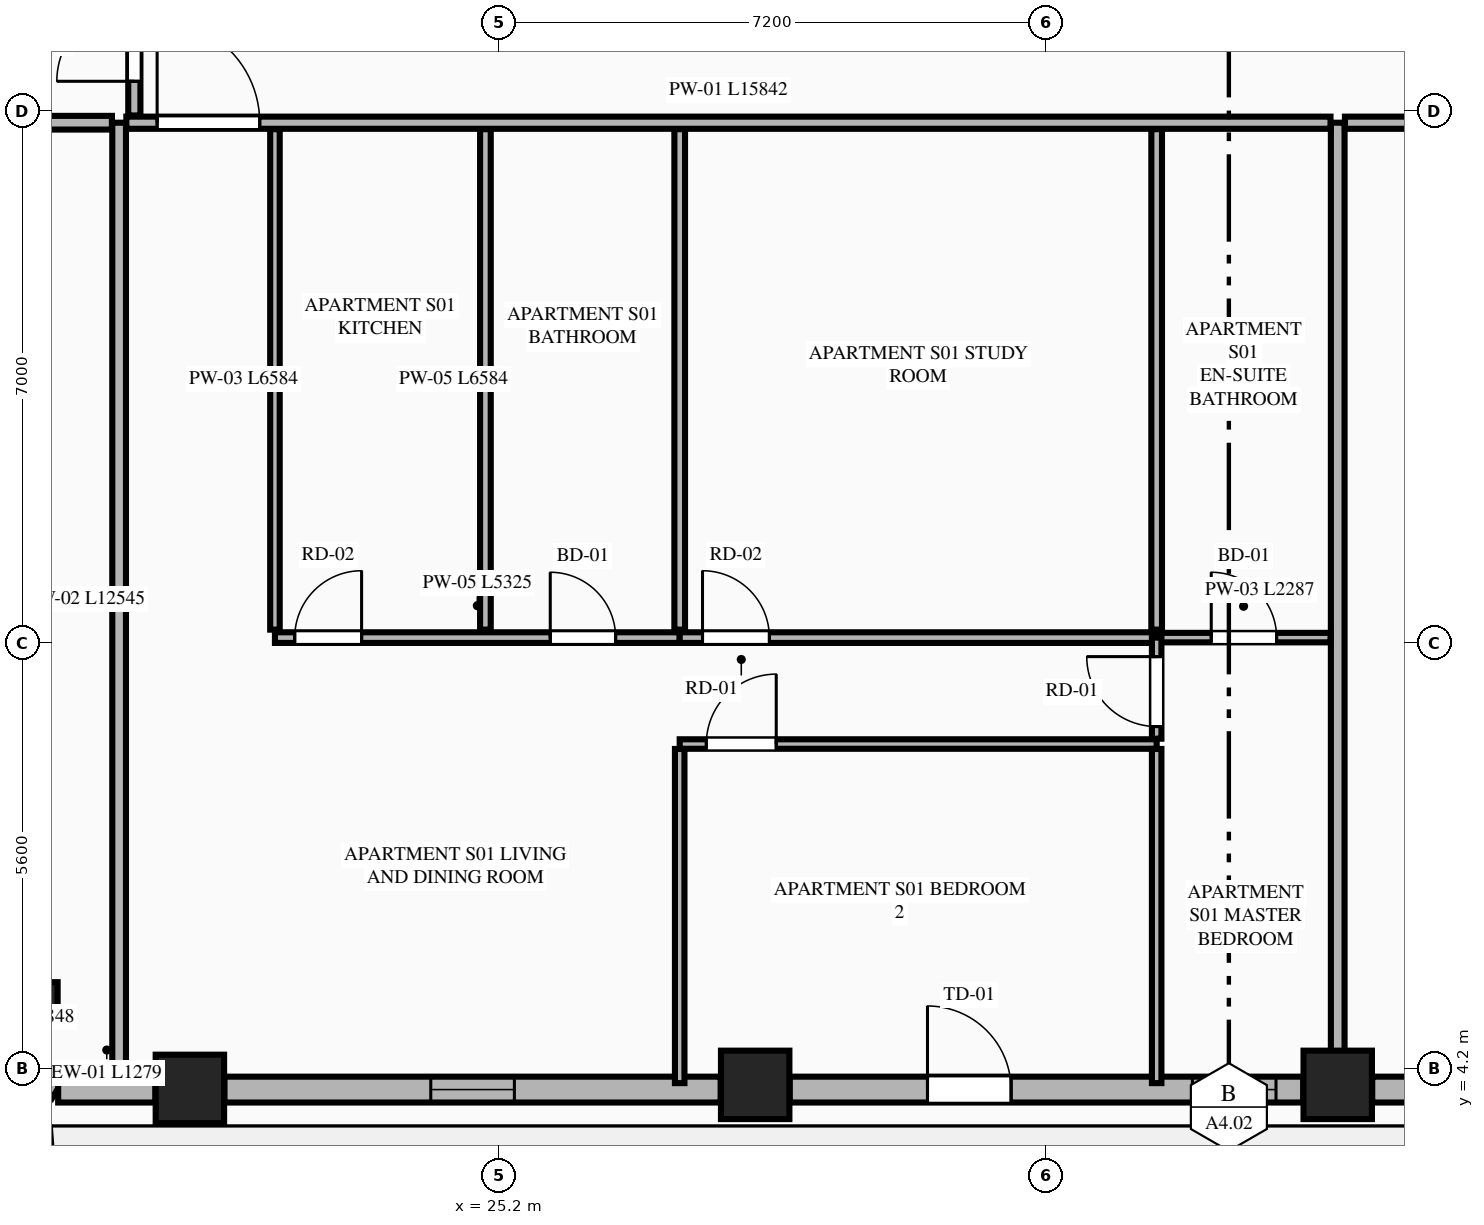
"""IFC4 building model, lengths in metres.
Left out: names, types, materials, properties, quantities, classifications, styles, units other than length and angle.
Written with IfcOpenShell. Run it as: python <this file> out.ifc"""

import sys

from ifc_helpers import new_model, si_unit, direction, frame, frame_2d, origin, origin_2d, place, context, subcontext, project, spatial, rectangle, extrude, element, fill, save


model = new_model("IFC4")
c1 = context("Model", 3, precision=1e-05, world=origin(), true_north=direction((0.0, 1.0)))
c2 = subcontext(c1, "Body", "Model", "MODEL_VIEW")
j1 = project(units=[si_unit("LENGTHUNIT", "METRE"), si_unit("PLANEANGLEUNIT", "RADIAN")], contexts=[c1])
p1 = place(None, origin())
s1 = spatial("IfcSite", under=j1, at=p1, CompositionType="ELEMENT")
p2 = place(p1, origin())
s2 = spatial("IfcBuilding", under=s1, at=p2, CompositionType="ELEMENT")
p3 = place(p2, frame((0.0, 0.0, 153.5)))
s3 = spatial("IfcBuildingStorey", under=s2, at=p3, CompositionType="ELEMENT", Elevation=153.5)
for number, where, z_axis, x_axis in (
    (1, (21.131, 3.939, 0.0), (0.0, 0.0, 1.0), (1.0, 0.0, 0.0)),
    (2, (28.568, 3.992, 0.0), (0.0, 0.0, 1.0), (1.0, 0.0, 0.0)),
    (3, (36.232, 3.992, 0.0), (0.0, 0.0, 1.0), (1.0, 0.0, 0.0)),
):
    element("IfcColumn", number, at=place(p3, frame(where, z_axis=z_axis, x_axis=x_axis)), inside=s3, PredefinedType="COLUMN", context=c2, shape_type="SweptSolid", body=[
        extrude(rectangle(XDim=0.9, YDim=0.9, at=origin_2d()), origin(), (0.0, 0.0, 1.0), 3.55),
    ])
p4 = place(p3, frame((19.141, 5.093, 0.0), z_axis=(0.0, 0.0, 1.0), x_axis=(0.865160173452, -0.501495637342, 0.0)))
e4 = element("IfcColumn", 4, at=p4, inside=s3, PredefinedType="PILASTER", context=c2, shape_type="SweptSolid", body=[
    extrude(rectangle(XDim=0.5, YDim=0.35, at=origin_2d()), origin(), (0.0, 0.0, 1.0), 3.55),
])
p5 = place(p3, frame((17.829, 4.923, 0.0), z_axis=(0.0, 0.0, 1.0), x_axis=(0.851798915137, -0.523868884523, 0.0)))
e5 = element("IfcWall", 5, at=p5, inside=s3, PredefinedType="STANDARD", context=c2, shape_type="SweptSolid", body=[
    extrude(rectangle(XDim=1.848, YDim=0.34, at=frame_2d((0.924, 0.0))), origin(), (0.0, 0.0, 1.0), 3.34),
])
p6 = place(p3, frame((19.398, 3.93, 0.0), z_axis=(0.0, 0.0, 1.0), x_axis=(1.0, 0.0, 0.0)))
e6 = element("IfcWall", 6, at=p6, inside=s3, PredefinedType="STANDARD", context=c2, shape_type="SweptSolid", body=[
    extrude(rectangle(XDim=1.279, YDim=0.34, at=frame_2d((0.64, 0.0))), origin(), (0.0, 0.0, 1.0), 3.34),
])
p7 = place(p3, frame((21.585, 3.93, 0.0), z_axis=(0.0, 0.0, 1.0), x_axis=(1.0, 0.0, 0.0)))
e7 = element("IfcWall", 7, at=p7, inside=s3, PredefinedType="STANDARD", context=c2, shape_type="SweptSolid", body=[
    extrude(rectangle(XDim=6.529, YDim=0.34, at=frame_2d((3.265, 0.0))), origin(), (0.0, 0.0, 1.0), 2.797),
])
p8 = place(p7, frame((2.715, 0.0, 0.75)))
e8 = element("IfcOpeningElement", 8, at=p8, cuts=e7, PredefinedType="OPENING", context=c2, shape_type="SweptSolid", body=[
    extrude(rectangle(XDim=1.1, YDim=1.897, at=frame_2d((0.55, 0.948))), frame((0.0, 0.18, 0.0), z_axis=(0.0, -1.0, 0.0), x_axis=(1.0, 0.0, 0.0)), (0.0, 0.0, 1.0), 0.36),
])
p9 = place(p3, frame((29.022, 3.93, 0.0), z_axis=(0.0, 0.0, 1.0), x_axis=(1.0, 0.0, 0.0)))
e9 = element("IfcWall", 9, at=p9, inside=s3, PredefinedType="STANDARD", context=c2, shape_type="SweptSolid", body=[
    extrude(rectangle(XDim=6.756, YDim=0.34, at=frame_2d((3.378, 0.0))), origin(), (0.0, 0.0, 1.0), 2.797),
])
p10 = place(p9, frame((1.813, 0.0, 0.0)))
e10 = element("IfcOpeningElement", 10, at=p10, cuts=e9, PredefinedType="OPENING", context=c2, shape_type="SweptSolid", body=[
    extrude(rectangle(XDim=1.1, YDim=2.25, at=frame_2d((0.55, 1.125))), frame((0.0, 0.18, 0.0), z_axis=(0.0, -1.0, 0.0), x_axis=(1.0, 0.0, 0.0)), (0.0, 0.0, 1.0), 0.36),
])
p11 = place(p9, frame((5.298, 0.0, 0.75)))
e11 = element("IfcOpeningElement", 11, at=p11, cuts=e9, PredefinedType="OPENING", context=c2, shape_type="SweptSolid", body=[
    extrude(rectangle(XDim=1.1, YDim=1.897, at=frame_2d((0.55, 0.948))), frame((0.0, 0.18, 0.0), z_axis=(0.0, -1.0, 0.0), x_axis=(1.0, 0.0, 0.0)), (0.0, 0.0, 1.0), 0.36),
])
p12 = place(p3, frame((36.686, 3.93, 0.0), z_axis=(0.0, 0.0, 1.0), x_axis=(1.0, 0.0, 0.0)))
e12 = element("IfcWall", 12, at=p12, inside=s3, PredefinedType="STANDARD", context=c2, shape_type="SweptSolid", body=[
    extrude(rectangle(XDim=6.529, YDim=0.34, at=frame_2d((3.265, 0.0))), origin(), (0.0, 0.0, 1.0), 2.797),
])
p13 = place(p12, frame((2.715, 0.0, 0.75)))
e13 = element("IfcOpeningElement", 13, at=p13, cuts=e12, PredefinedType="OPENING", context=c2, shape_type="SweptSolid", body=[
    extrude(rectangle(XDim=1.1, YDim=1.897, at=frame_2d((0.55, 0.948))), frame((0.0, 0.18, 0.0), z_axis=(0.0, -1.0, 0.0), x_axis=(1.0, 0.0, 0.0)), (0.0, 0.0, 1.0), 0.36),
])
p14 = place(p3, frame((20.2, 4.105, 0.0), z_axis=(0.0, 0.0, 1.0), x_axis=(0.0, 1.0, 0.0)))
e14 = element("IfcWall", 14, at=p14, inside=s3, PredefinedType="PARTITIONING", context=c2, shape_type="SweptSolid", body=[
    extrude(rectangle(XDim=12.545, YDim=0.18, at=frame_2d((6.272, 0.0))), origin(), (0.0, 0.0, 1.0), 3.34),
])
p15 = place(p3, frame((36.232, 4.105, 0.0), z_axis=(0.0, 0.0, 1.0), x_axis=(0.0, 1.0, 0.0)))
e15 = element("IfcWall", 15, at=p15, inside=s3, PredefinedType="PARTITIONING", context=c2, shape_type="SweptSolid", body=[
    extrude(rectangle(XDim=12.545, YDim=0.18, at=frame_2d((6.272, 0.0))), origin(), (0.0, 0.0, 1.0), 2.722),
])
p16 = place(p3, frame((20.295, 16.65, 0.0), z_axis=(0.0, 0.0, 1.0), x_axis=(1.0, 0.0, 0.0)))
e16 = element("IfcWall", 16, at=p16, inside=s3, PredefinedType="PARTITIONING", context=c2, shape_type="SweptSolid", body=[
    extrude(rectangle(XDim=15.842, YDim=0.16, at=frame_2d((7.921, 0.0))), origin(), (0.0, 0.0, 1.0), 3.34),
])
p17 = place(p16, frame((0.405, 0.0, 0.0)))
e17 = element("IfcOpeningElement", 17, at=p17, cuts=e16, PredefinedType="OPENING", context=c2, shape_type="SweptSolid", body=[
    extrude(rectangle(XDim=1.35, YDim=2.35, at=frame_2d((0.675, 1.175))), frame((0.0, 0.09, 0.0), z_axis=(0.0, -1.0, 0.0), x_axis=(1.0, 0.0, 0.0)), (0.0, 0.0, 1.0), 0.18),
])
p18 = place(p3, frame((22.25, 9.981, 0.0), z_axis=(0.0, 0.0, 1.0), x_axis=(0.0, 1.0, 0.0)))
e18 = element("IfcWall", 18, at=p18, inside=s3, PredefinedType="PARTITIONING", context=c2, shape_type="SweptSolid", body=[
    extrude(rectangle(XDim=6.584, YDim=0.125, at=frame_2d((3.292, 0.0))), origin(), (0.0, 0.0, 1.0), 2.722),
])
p19 = place(p3, frame((22.25, 9.876, 0.0), z_axis=(0.0, 0.0, 1.0), x_axis=(1.0, 0.0, 0.0)))
e19 = element("IfcWall", 19, at=p19, inside=s3, PredefinedType="PLUMBINGWALL", context=c2, shape_type="SweptSolid", body=[
    extrude(rectangle(XDim=5.325, YDim=0.14, at=frame_2d((2.663, 0.0))), origin(), (0.0, 0.0, 1.0), 3.34),
])
p20 = place(p19, frame((3.622, 0.0, 0.0)))
e20 = element("IfcOpeningElement", 20, at=p20, cuts=e19, PredefinedType="OPENING", context=c2, shape_type="SweptSolid", body=[
    extrude(rectangle(XDim=0.86, YDim=2.1, at=frame_2d((0.43, 1.05))), frame((0.0, 0.08, 0.0), z_axis=(0.0, -1.0, 0.0), x_axis=(1.0, 0.0, 0.0)), (0.0, 0.0, 1.0), 0.16),
])
p21 = place(p19, frame((0.26, 0.0, 0.0)))
e21 = element("IfcOpeningElement", 21, at=p21, cuts=e19, PredefinedType="OPENING", context=c2, shape_type="SweptSolid", body=[
    extrude(rectangle(XDim=0.88, YDim=2.15, at=frame_2d((0.44, 1.075))), frame((0.0, 0.08, 0.0), z_axis=(0.0, -1.0, 0.0), x_axis=(1.0, 0.0, 0.0)), (0.0, 0.0, 1.0), 0.16),
])
p22 = place(p3, frame((27.575, 9.876, 0.0), z_axis=(0.0, 0.0, 1.0), x_axis=(1.0, 0.0, 0.0)))
e22 = element("IfcWall", 22, at=p22, inside=s3, PredefinedType="PLUMBINGWALL", context=c2, shape_type="SweptSolid", body=[
    extrude(rectangle(XDim=6.275, YDim=0.14, at=frame_2d((3.138, 0.0))), origin(), (0.0, 0.0, 1.0), 3.34),
])
p23 = place(p22, frame((0.3, 0.0, 0.0)))
e23 = element("IfcOpeningElement", 23, at=p23, cuts=e22, PredefinedType="OPENING", context=c2, shape_type="SweptSolid", body=[
    extrude(rectangle(XDim=0.88, YDim=2.15, at=frame_2d((0.44, 1.075))), frame((0.0, 0.08, 0.0), z_axis=(0.0, -1.0, 0.0), x_axis=(1.0, 0.0, 0.0)), (0.0, 0.0, 1.0), 0.16),
])
p24 = place(p3, frame((33.85, 9.876, 0.0), z_axis=(0.0, 0.0, 1.0), x_axis=(1.0, 0.0, 0.0)))
e24 = element("IfcWall", 24, at=p24, inside=s3, PredefinedType="PARTITIONING", context=c2, shape_type="SweptSolid", body=[
    extrude(rectangle(XDim=2.287, YDim=0.125, at=frame_2d((1.144, 0.0))), origin(), (0.0, 0.0, 1.0), 3.34),
])
p25 = place(p24, frame((0.718, 0.0, 0.0)))
e25 = element("IfcOpeningElement", 25, at=p25, cuts=e24, PredefinedType="OPENING", context=c2, shape_type="SweptSolid", body=[
    extrude(rectangle(XDim=0.86, YDim=2.1, at=frame_2d((0.43, 1.05))), frame((0.0, 0.073, 0.0), z_axis=(0.0, -1.0, 0.0), x_axis=(1.0, 0.0, 0.0)), (0.0, 0.0, 1.0), 0.145),
])
p26 = place(p3, frame((25.019, 9.981, 0.0), z_axis=(0.0, 0.0, 1.0), x_axis=(0.0, 1.0, 0.0)))
e26 = element("IfcWall", 26, at=p26, inside=s3, PredefinedType="PLUMBINGWALL", context=c2, shape_type="SweptSolid", body=[
    extrude(rectangle(XDim=6.584, YDim=0.14, at=frame_2d((3.292, 0.0))), origin(), (0.0, 0.0, 1.0), 3.34),
])
p27 = place(p3, frame((27.575, 4.015, 0.0), z_axis=(0.0, 0.0, 1.0), x_axis=(0.0, 1.0, 0.0)))
e27 = element("IfcWall", 27, at=p27, inside=s3, PredefinedType="PARTITIONING", context=c2, shape_type="SweptSolid", body=[
    extrude(rectangle(XDim=4.396, YDim=0.125, at=frame_2d((2.198, 0.0))), origin(), (0.0, 0.0, 1.0), 3.34),
])
p28 = place(p3, frame((27.575, 8.476, 0.0), z_axis=(0.0, 0.0, 1.0), x_axis=(1.0, 0.0, 0.0)))
e28 = element("IfcWall", 28, at=p28, inside=s3, PredefinedType="PARTITIONING", context=c2, shape_type="SweptSolid", body=[
    extrude(rectangle(XDim=6.275, YDim=0.125, at=frame_2d((3.138, 0.0))), origin(), (0.0, 0.0, 1.0), 3.34),
])
p29 = place(p28, frame((0.35, 0.0, 0.0)))
e29 = element("IfcOpeningElement", 29, at=p29, cuts=e28, PredefinedType="OPENING", context=c2, shape_type="SweptSolid", body=[
    extrude(rectangle(XDim=0.92, YDim=2.15, at=frame_2d((0.46, 1.075))), frame((0.0, 0.073, 0.0), z_axis=(0.0, -1.0, 0.0), x_axis=(1.0, 0.0, 0.0)), (0.0, 0.0, 1.0), 0.145),
])
p30 = place(p3, frame((33.85, 8.546, 0.0), z_axis=(0.0, 0.0, 1.0), x_axis=(0.0, 1.0, 0.0)))
e30 = element("IfcWall", 30, at=p30, inside=s3, PredefinedType="PARTITIONING", context=c2, shape_type="SweptSolid", body=[
    extrude(rectangle(XDim=1.33, YDim=0.125, at=frame_2d((0.665, 0.0))), origin(), (0.0, 0.0, 1.0), 3.34),
])
p31 = place(p30, frame((0.16, 0.0, 0.0)))
e31 = element("IfcOpeningElement", 31, at=p31, cuts=e30, PredefinedType="OPENING", context=c2, shape_type="SweptSolid", body=[
    extrude(rectangle(XDim=0.92, YDim=2.15, at=frame_2d((0.46, 1.075))), frame((0.0, 0.073, 0.0), z_axis=(0.0, -1.0, 0.0), x_axis=(1.0, 0.0, 0.0)), (0.0, 0.0, 1.0), 0.145),
])
for number, where, z_axis, x_axis in (
    (32, (27.575, 9.981, 0.0), (0.0, 0.0, 1.0), (0.0, 1.0, 0.0)),
    (33, (33.85, 9.981, 0.0), (0.0, 0.0, 1.0), (0.0, 1.0, 0.0)),
):
    element("IfcWall", number, at=place(p3, frame(where, z_axis=z_axis, x_axis=x_axis)), inside=s3, PredefinedType="PLUMBINGWALL", context=c2, shape_type="SweptSolid", body=[
        extrude(rectangle(XDim=6.584, YDim=0.14, at=frame_2d((3.292, 0.0))), origin(), (0.0, 0.0, 1.0), 3.34),
    ])
p32 = place(p3, frame((33.85, 4.015, 0.0), z_axis=(0.0, 0.0, 1.0), x_axis=(0.0, 1.0, 0.0)))
e34 = element("IfcWall", 34, at=p32, inside=s3, PredefinedType="PARTITIONING", context=c2, shape_type="SweptSolid", body=[
    extrude(rectangle(XDim=4.396, YDim=0.125, at=frame_2d((2.198, 0.0))), origin(), (0.0, 0.0, 1.0), 3.34),
])
p33 = place(p3, frame((36.327, 16.65, 0.0), z_axis=(0.0, 0.0, 1.0), x_axis=(1.0, 0.0, 0.0)))
e35 = element("IfcWall", 35, at=p33, inside=s3, PredefinedType="PARTITIONING", context=c2, shape_type="SweptSolid", body=[
    extrude(rectangle(XDim=8.178, YDim=0.16, at=frame_2d((4.089, 0.0))), origin(), (0.0, 0.0, 1.0), 3.34),
])
p34 = place(p33, frame((5.923, 0.0, 0.0)))
e36 = element("IfcOpeningElement", 36, at=p34, cuts=e35, PredefinedType="OPENING", context=c2, shape_type="SweptSolid", body=[
    extrude(rectangle(XDim=1.02, YDim=2.25, at=frame_2d((0.51, 1.125))), frame((0.0, 0.09, 0.0), z_axis=(0.0, -1.0, 0.0), x_axis=(1.0, 0.0, 0.0)), (0.0, 0.0, 1.0), 0.18),
])
p35 = place(p3, frame((12.109, 16.65, 0.0), z_axis=(0.0, 0.0, 1.0), x_axis=(1.0, 0.0, 0.0)))
e37 = element("IfcWall", 37, at=p35, inside=s3, PredefinedType="PARTITIONING", context=c2, shape_type="SweptSolid", body=[
    extrude(rectangle(XDim=7.996, YDim=0.18, at=frame_2d((3.998, 0.0))), origin(), (0.0, 0.0, 1.0), 3.34),
])
p36 = place(p3, frame((20.4, 16.745, 0.0), z_axis=(0.0, 0.0, 1.0), x_axis=(0.0, 1.0, 0.0)))
e38 = element("IfcWall", 38, at=p36, inside=s3, PredefinedType="PARTITIONING", context=c2, shape_type="SweptSolid", body=[
    extrude(rectangle(XDim=18.31, YDim=0.16, at=frame_2d((9.155, 0.0))), origin(), (0.0, 0.0, 1.0), 3.34),
])
p37 = place(p36, frame((0.45, 0.0, 0.0)))
e39 = element("IfcOpeningElement", 39, at=p37, cuts=e38, PredefinedType="OPENING", context=c2, shape_type="SweptSolid", body=[
    extrude(rectangle(XDim=1.02, YDim=2.25, at=frame_2d((0.51, 1.125))), frame((0.0, 0.09, 0.0), z_axis=(0.0, -1.0, 0.0), x_axis=(1.0, 0.0, 0.0)), (0.0, 0.0, 1.0), 0.18),
])
p38 = place(p8, origin())
e40 = element("IfcWindow", 40, at=p38, inside=s3, PartitioningType="SINGLE_PANEL", PredefinedType="WINDOW", context=c2, shape_type="SweptSolid", body=[
    extrude(rectangle(XDim=1.1, YDim=1.897, at=frame_2d((0.55, 0.948))), frame((0.0, 0.03, 0.0), z_axis=(0.0, -1.0, 0.0), x_axis=(1.0, 0.0, 0.0)), (0.0, 0.0, 1.0), 0.06),
])
fill(e8, e40)
p39 = place(p10, origin())
e41 = element("IfcDoor", 41, at=p39, inside=s3, OperationType="SINGLE_SWING_LEFT", PredefinedType="DOOR", context=c2, shape_type="SweptSolid", body=[
    extrude(rectangle(XDim=1.1, YDim=2.25, at=frame_2d((0.55, 1.125))), frame((0.0, 0.025, 0.0), z_axis=(0.0, -1.0, 0.0), x_axis=(1.0, 0.0, 0.0)), (0.0, 0.0, 1.0), 0.05),
])
fill(e10, e41)
p40 = place(p20, origin())
e42 = element("IfcDoor", 42, at=p40, inside=s3, OperationType="SINGLE_SWING_LEFT", PredefinedType="DOOR", context=c2, shape_type="SweptSolid", body=[
    extrude(rectangle(XDim=0.86, YDim=2.1, at=frame_2d((0.43, 1.05))), frame((0.0, 0.025, 0.0), z_axis=(0.0, -1.0, 0.0), x_axis=(1.0, 0.0, 0.0)), (0.0, 0.0, 1.0), 0.05),
])
fill(e20, e42)
p41 = place(p25, origin())
e43 = element("IfcDoor", 43, at=p41, inside=s3, OperationType="SINGLE_SWING_LEFT", PredefinedType="DOOR", context=c2, shape_type="SweptSolid", body=[
    extrude(rectangle(XDim=0.86, YDim=2.1, at=frame_2d((0.43, 1.05))), frame((0.0, 0.025, 0.0), z_axis=(0.0, -1.0, 0.0), x_axis=(1.0, 0.0, 0.0)), (0.0, 0.0, 1.0), 0.05),
])
fill(e25, e43)
p42 = place(p17, origin())
e44 = element("IfcDoor", 44, at=p42, inside=s3, OperationType="SINGLE_SWING_LEFT", PredefinedType="DOOR", context=c2, shape_type="SweptSolid", body=[
    extrude(rectangle(XDim=1.35, YDim=2.35, at=frame_2d((0.675, 1.175))), frame((0.0, 0.025, 0.0), z_axis=(0.0, -1.0, 0.0), x_axis=(1.0, 0.0, 0.0)), (0.0, 0.0, 1.0), 0.05),
])
fill(e17, e44)
p43 = place(p21, origin())
e45 = element("IfcDoor", 45, at=p43, inside=s3, OperationType="SINGLE_SWING_RIGHT", PredefinedType="DOOR", context=c2, shape_type="SweptSolid", body=[
    extrude(rectangle(XDim=0.88, YDim=2.15, at=frame_2d((0.44, 1.075))), frame((0.0, 0.025, 0.0), z_axis=(0.0, -1.0, 0.0), x_axis=(1.0, 0.0, 0.0)), (0.0, 0.0, 1.0), 0.05),
])
fill(e21, e45)
p44 = place(p23, origin())
e46 = element("IfcDoor", 46, at=p44, inside=s3, OperationType="SINGLE_SWING_LEFT", PredefinedType="DOOR", context=c2, shape_type="SweptSolid", body=[
    extrude(rectangle(XDim=0.88, YDim=2.15, at=frame_2d((0.44, 1.075))), frame((0.0, 0.025, 0.0), z_axis=(0.0, -1.0, 0.0), x_axis=(1.0, 0.0, 0.0)), (0.0, 0.0, 1.0), 0.05),
])
fill(e23, e46)
p45 = place(p29, origin())
e47 = element("IfcDoor", 47, at=p45, inside=s3, OperationType="SINGLE_SWING_RIGHT", PredefinedType="DOOR", context=c2, shape_type="SweptSolid", body=[
    extrude(rectangle(XDim=0.92, YDim=2.15, at=frame_2d((0.46, 1.075))), frame((0.0, 0.025, 0.0), z_axis=(0.0, -1.0, 0.0), x_axis=(1.0, 0.0, 0.0)), (0.0, 0.0, 1.0), 0.05),
])
fill(e29, e47)
p46 = place(p31, origin())
e48 = element("IfcDoor", 48, at=p46, inside=s3, OperationType="SINGLE_SWING_RIGHT", PredefinedType="DOOR", context=c2, shape_type="SweptSolid", body=[
    extrude(rectangle(XDim=0.92, YDim=2.15, at=frame_2d((0.46, 1.075))), frame((0.0, 0.025, 0.0), z_axis=(0.0, -1.0, 0.0), x_axis=(1.0, 0.0, 0.0)), (0.0, 0.0, 1.0), 0.05),
])
fill(e31, e48)
p47 = place(p37, origin())
e49 = element("IfcDoor", 49, at=p47, inside=s3, OperationType="SINGLE_SWING_LEFT", PredefinedType="DOOR", context=c2, shape_type="SweptSolid", body=[
    extrude(rectangle(XDim=1.02, YDim=2.25, at=frame_2d((0.51, 1.125))), frame((0.0, 0.025, 0.0), z_axis=(0.0, -1.0, 0.0), x_axis=(1.0, 0.0, 0.0)), (0.0, 0.0, 1.0), 0.05),
])
fill(e39, e49)
p48 = place(p11, origin())
e50 = element("IfcWindow", 50, at=p48, inside=s3, PartitioningType="SINGLE_PANEL", PredefinedType="WINDOW", context=c2, shape_type="SweptSolid", body=[
    extrude(rectangle(XDim=1.1, YDim=1.897, at=frame_2d((0.55, 0.948))), frame((0.0, 0.03, 0.0), z_axis=(0.0, -1.0, 0.0), x_axis=(1.0, 0.0, 0.0)), (0.0, 0.0, 1.0), 0.06),
])
fill(e11, e50)
save(model, sys.argv[1])
